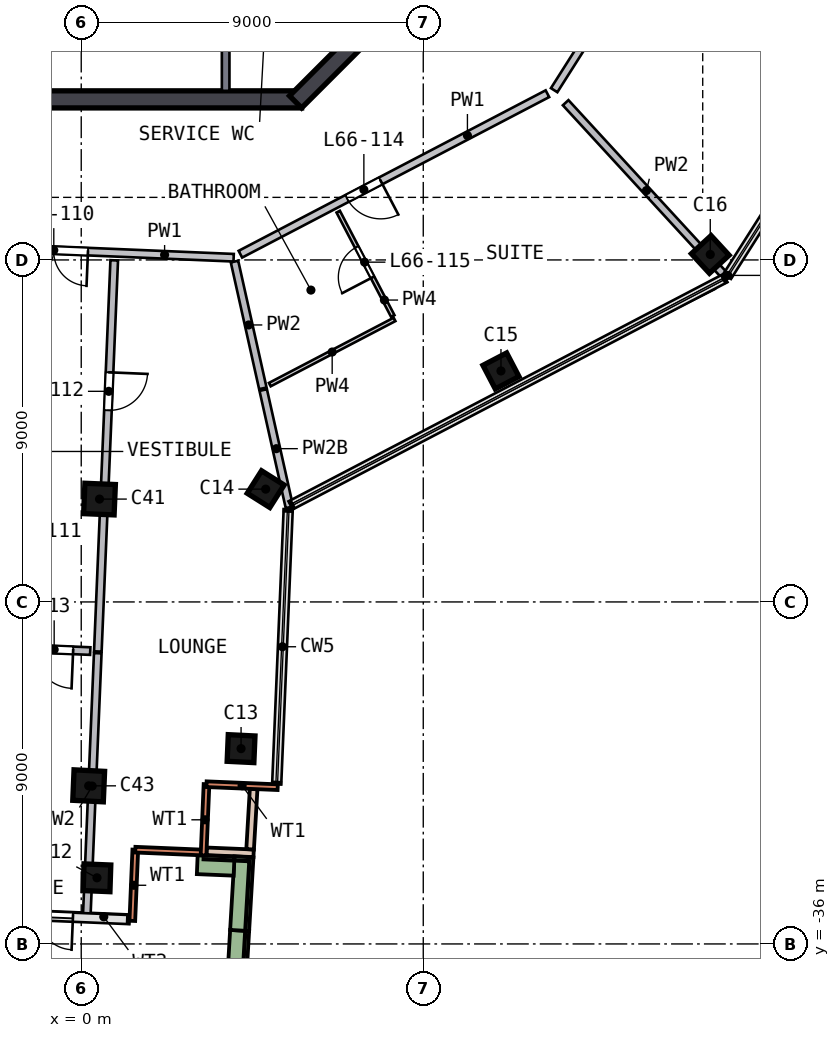
"""IFC4 building model, lengths in metres.
Left out: names, types, materials, properties, quantities, classifications, styles, units other than length and angle.
Written with IfcOpenShell. Run it as: python <this file> out.ifc"""

import sys

from ifc_helpers import new_model, si_unit, direction, frame, frame_2d, origin, origin_2d, place, context, subcontext, project, spatial, rectangle, extrude, element, fill, save


model = new_model("IFC4")
c1 = context("Model", 3, precision=1e-05, world=origin(), true_north=direction((0.0, 1.0)))
c2 = subcontext(c1, "Body", "Model", "MODEL_VIEW")
j1 = project(units=[si_unit("LENGTHUNIT", "METRE"), si_unit("PLANEANGLEUNIT", "RADIAN")], contexts=[c1])
p1 = place(None, origin())
s1 = spatial("IfcSite", under=j1, at=p1, CompositionType="ELEMENT")
p2 = place(p1, origin())
s2 = spatial("IfcBuilding", under=s1, at=p2, CompositionType="ELEMENT")
p3 = place(p2, frame((0.0, 0.0, 269.0)))
s3 = spatial("IfcBuildingStorey", under=s2, at=p3, CompositionType="ELEMENT", Elevation=269.0)
p4 = place(p3, frame((0.28, -34.157, 0.0), z_axis=(0.111186081, -0.084381834, 0.990210766), x_axis=(0.99292035, -0.032471752, -0.114257442)))
e1 = element("IfcColumn", 1, at=p4, inside=s3, PredefinedType="COLUMN", context=c2, shape_type="SweptSolid", body=[
    extrude(rectangle(XDim=0.7, YDim=0.7, at=origin_2d()), origin(), (0.0, 0.0, 1.0), 4.736),
])
p5 = place(p3, frame((4.085, -30.773, 0.0), z_axis=(0.100012936, -0.071961787, 0.992380428), x_axis=(0.048803713, 0.996535449, 0.067344607)))
e2 = element("IfcColumn", 2, at=p5, inside=s3, PredefinedType="COLUMN", context=c2, shape_type="SweptSolid", body=[
    extrude(rectangle(XDim=0.7, YDim=0.7, at=origin_2d()), origin(), (0.0, 0.0, 1.0), 4.726),
])
p6 = place(p3, frame((4.757, -24.052, 0.0), z_axis=(0.080208495, 0.016602017, 0.99663984), x_axis=(-0.53173331, -0.845000335, 0.056869329)))
e3 = element("IfcColumn", 3, at=p6, inside=s3, PredefinedType="COLUMN", context=c2, shape_type="SweptSolid", body=[
    extrude(rectangle(XDim=0.7, YDim=0.7, at=origin_2d()), origin(), (0.0, 0.0, 1.0), 4.706),
])
p7 = place(p3, frame((10.961, -20.966, 0.0), z_axis=(0.069744627, 0.037207513, 0.996870748), x_axis=(0.88346195, 0.461786436, -0.079046004)))
e4 = element("IfcColumn", 4, at=p7, inside=s3, PredefinedType="COLUMN", context=c2, shape_type="SweptSolid", body=[
    extrude(rectangle(XDim=0.7, YDim=0.7, at=origin_2d()), origin(), (0.0, 0.0, 1.0), 4.705),
])
p8 = place(p3, frame((16.481, -17.923, 0.0), z_axis=(0.059355146, 0.055567624, 0.996689122), x_axis=(-0.733316452, -0.675008632, 0.081303918)))
e5 = element("IfcColumn", 5, at=p8, inside=s3, PredefinedType="COLUMN", context=c2, shape_type="SweptSolid", body=[
    extrude(rectangle(XDim=0.7, YDim=0.7, at=origin_2d()), origin(), (0.0, 0.0, 1.0), 4.706),
])
p9 = place(p3, frame((0.383, -24.296, 0.0), z_axis=(0.081147279, 0.001919725, 0.996700273), x_axis=(-0.041927087, -0.999106414, 0.005337892)))
e6 = element("IfcColumn", 6, at=p9, inside=s3, PredefinedType="COLUMN", context=c2, shape_type="SweptSolid", body=[
    extrude(rectangle(XDim=0.8, YDim=0.8, at=origin_2d()), origin(), (0.0, 0.0, 1.0), 4.706),
])
p10 = place(p3, frame((0.071, -31.736, 0.0), z_axis=(0.10322703, -0.085222915, 0.991000119), x_axis=(-0.050566581, -0.995483953, -0.080341268)))
e7 = element("IfcColumn", 7, at=p10, inside=s3, PredefinedType="COLUMN", context=c2, shape_type="SweptSolid", body=[
    extrude(rectangle(XDim=0.8, YDim=0.8, at=origin_2d()), origin(), (0.0, 0.0, 1.0), 4.732),
])
p11 = place(p3, frame((-5.799, -13.775, 0.0), z_axis=(0.0, 0.0, 1.0), x_axis=(1.0, 0.0, 0.0)))
e8 = element("IfcWall", 8, at=p11, inside=s3, PredefinedType="SHEAR", context=c2, shape_type="SweptSolid", body=[
    extrude(rectangle(XDim=11.598, YDim=0.45, at=frame_2d((5.799, 0.0))), origin(), (0.0, 0.0, 1.0), 5.0),
])
p12 = place(p3, frame((5.64, -13.841, 0.0), z_axis=(0.0, 0.0, 1.0), x_axis=(0.707106781, 0.707106781, 0.0)))
e9 = element("IfcWall", 9, at=p12, inside=s3, PredefinedType="SHEAR", context=c2, shape_type="SweptSolid", body=[
    extrude(rectangle(XDim=11.598, YDim=0.45, at=frame_2d((5.799, 0.0))), origin(), (0.0, 0.0, 1.0), 5.0),
])
p13 = place(p12, frame((2.099, 0.0, 0.0)))
e10 = element("IfcOpeningElement", 10, at=p13, cuts=e9, PredefinedType="OPENING", context=c2, shape_type="SweptSolid", body=[
    extrude(rectangle(XDim=1.2, YDim=2.1, at=frame_2d((0.6, 1.05))), frame((0.0, 0.235, 0.0), z_axis=(0.0, -1.0, 0.0), x_axis=(1.0, 0.0, 0.0)), (0.0, 0.0, 1.0), 0.47),
])
p14 = place(p3, frame((1.344, -35.393, 0.0), z_axis=(0.0, 0.0, 1.0), x_axis=(0.041922975, 0.999120846, 0.0)))
e11 = element("IfcWall", 11, at=p14, inside=s3, PredefinedType="SOLIDWALL", context=c2, shape_type="SweptSolid", body=[
    extrude(rectangle(XDim=1.875, YDim=0.15, at=frame_2d((0.938, 0.0))), origin(), (0.0, 0.0, 1.0), 4.69),
])
p15 = place(p3, frame((1.423, -33.519, 0.0), z_axis=(0.0, 0.0, 1.0), x_axis=(0.999121279, -0.041912636, 0.0)))
e12 = element("IfcWall", 12, at=p15, inside=s3, PredefinedType="SOLIDWALL", context=c2, shape_type="SweptSolid", body=[
    extrude(rectangle(XDim=1.8, YDim=0.15, at=frame_2d((0.9, 0.0))), origin(), (0.0, 0.0, 1.0), 4.69),
])
for number, where, z_axis, x_axis in (
    (13, (3.218, -33.67, 0.0), (0.0, 0.0, 1.0), (0.042, 0.999, 0.0)),
    (14, (3.296, -31.796, 0.0), (0.0, 0.0, 1.0), (0.999, -0.042, 0.0)),
):
    element("IfcWall", number, at=place(p3, frame(where, z_axis=z_axis, x_axis=x_axis)), inside=s3, PredefinedType="SOLIDWALL", context=c2, shape_type="SweptSolid", body=[
        extrude(rectangle(XDim=1.875, YDim=0.15, at=frame_2d((0.938, 0.0))), origin(), (0.0, 0.0, 1.0), 4.69),
    ])
p16 = place(p3, frame((1.202, -35.312, 0.0), z_axis=(0.0, 0.0, 1.0), x_axis=(-0.99912264, 0.0418802, 0.0)))
e15 = element("IfcWall", 15, at=p16, inside=s3, PredefinedType="SOLIDWALL", context=c2, shape_type="SweptSolid", body=[
    extrude(rectangle(XDim=3.62, YDim=0.15, at=frame_2d((1.81, 0.0))), origin(), (0.0, 0.0, 1.0), 4.015),
])
p17 = place(p16, frame((1.42, 0.0, 0.0)))
e16 = element("IfcOpeningElement", 16, at=p17, cuts=e15, PredefinedType="OPENING", context=c2, shape_type="SweptSolid", body=[
    extrude(rectangle(XDim=1.8, YDim=2.4, at=frame_2d((0.9, 1.2))), frame((0.0, 0.085, 0.0), z_axis=(0.0, -1.0, 0.0), x_axis=(1.0, 0.0, 0.0)), (0.0, 0.0, 1.0), 0.17),
])
p18 = place(p3, frame((4.086, -37.046, 0.0), z_axis=(0.0, 0.0, 1.0), x_axis=(0.058640418, 0.99827917, 0.0)))
e17 = element("IfcWall", 17, at=p18, inside=s3, PredefinedType="SOLIDWALL", context=c2, shape_type="SweptSolid", body=[
    extrude(rectangle(XDim=1.403, YDim=0.5, at=frame_2d((0.702, 0.0))), origin(), (0.0, 0.0, 1.0), 0.7),
])
p19 = place(p3, frame((4.168, -35.646, 0.0), z_axis=(0.0, 0.0, 1.0), x_axis=(0.058670359, 0.998277411, 0.0)))
e18 = element("IfcWall", 18, at=p19, inside=s3, PredefinedType="SOLIDWALL", context=c2, shape_type="SweptSolid", body=[
    extrude(rectangle(XDim=1.939, YDim=0.5, at=frame_2d((0.97, 0.0))), origin(), (0.0, 0.0, 1.0), 0.7),
])
p20 = place(p3, frame((4.021, -33.954, 0.0), z_axis=(0.0, 0.0, 1.0), x_axis=(-0.999125196, 0.041819158, 0.0)))
e19 = element("IfcWall", 19, at=p20, inside=s3, PredefinedType="SOLIDWALL", context=c2, shape_type="SweptSolid", body=[
    extrude(rectangle(XDim=0.969, YDim=0.5, at=frame_2d((0.484, 0.0))), origin(), (0.0, 0.0, 1.0), 0.7),
])
p21 = place(p3, frame((3.298, -33.563, 0.0), z_axis=(0.0, 0.0, 1.0), x_axis=(0.99912657, -0.041786315, 0.0)))
e20 = element("IfcWall", 20, at=p21, inside=s3, PredefinedType="PARAPET", context=c2, shape_type="SweptSolid", body=[
    extrude(rectangle(XDim=1.239, YDim=0.2, at=frame_2d((0.619, 0.0))), origin(), (0.0, 0.0, 1.0), 1.1),
])
p22 = place(p3, frame((4.444, -33.509, 0.0), z_axis=(0.0, 0.0, 1.0), x_axis=(0.058586809, 0.998282318, 0.0)))
e21 = element("IfcWall", 21, at=p22, inside=s3, PredefinedType="PARAPET", context=c2, shape_type="SweptSolid", body=[
    extrude(rectangle(XDim=1.588, YDim=0.2, at=frame_2d((0.794, 0.0))), origin(), (0.0, 0.0, 1.0), 1.1),
])
p23 = place(p3, frame((3.8, -10.9, 0.0), z_axis=(0.0, 0.0, 1.0), x_axis=(0.0, -1.0, 0.0)))
e22 = element("IfcWall", 22, at=p23, inside=s3, PredefinedType="SOLIDWALL", context=c2, shape_type="SweptSolid", body=[
    extrude(rectangle(XDim=2.65, YDim=0.2, at=frame_2d((1.325, 0.0))), origin(), (0.0, 0.0, 1.0), 4.69),
])
p24 = place(p3, frame((4.01, -17.942, 0.0), z_axis=(0.0, 0.0, 1.0), x_axis=(-0.999123966, 0.041848536, 0.0)))
e23 = element("IfcWall", 23, at=p24, inside=s3, PredefinedType="SOLIDWALL", context=c2, shape_type="SweptSolid", body=[
    extrude(rectangle(XDim=9.317, YDim=0.2, at=frame_2d((4.658, 0.0))), origin(), (0.0, 0.0, 1.0), 4.69),
])
p25 = place(p24, frame((3.837, 0.0, 0.0)))
e24 = element("IfcOpeningElement", 24, at=p25, cuts=e23, PredefinedType="OPENING", context=c2, shape_type="SweptSolid", body=[
    extrude(rectangle(XDim=1.8, YDim=2.1, at=frame_2d((0.9, 1.05))), frame((0.0, 0.11, 0.0), z_axis=(0.0, -1.0, 0.0), x_axis=(1.0, 0.0, 0.0)), (0.0, 0.0, 1.0), 0.22),
])
p26 = place(p3, frame((12.267, -13.626, 0.0), z_axis=(0.0, 0.0, 1.0), x_axis=(-0.886204454, -0.463294363, 0.0)))
e25 = element("IfcWall", 25, at=p26, inside=s3, PredefinedType="SOLIDWALL", context=c2, shape_type="SweptSolid", body=[
    extrude(rectangle(XDim=9.116, YDim=0.2, at=frame_2d((4.558, 0.0))), origin(), (0.0, 0.0, 1.0), 4.69),
])
p27 = place(p26, frame((4.95, 0.0, 0.0)))
e26 = element("IfcOpeningElement", 26, at=p27, cuts=e25, PredefinedType="OPENING", context=c2, shape_type="SweptSolid", body=[
    extrude(rectangle(XDim=1.0, YDim=2.1, at=frame_2d((0.5, 1.05))), frame((0.0, 0.11, 0.0), z_axis=(0.0, -1.0, 0.0), x_axis=(1.0, 0.0, 0.0)), (0.0, 0.0, 1.0), 0.22),
])
p28 = place(p3, frame((12.444, -13.533, 0.0), z_axis=(0.0, 0.0, 1.0), x_axis=(0.535839212, 0.844320045, 0.0)))
e27 = element("IfcWall", 27, at=p28, inside=s3, PredefinedType="SOLIDWALL", context=c2, shape_type="SweptSolid", body=[
    extrude(rectangle(XDim=9.516, YDim=0.2, at=frame_2d((4.758, 0.0))), origin(), (0.0, 0.0, 1.0), 4.69),
])
p29 = place(p3, frame((0.237, -28.293, 0.0), z_axis=(0.0, 0.0, 1.0), x_axis=(-0.999120946, 0.041920578, 0.0)))
e28 = element("IfcWall", 28, at=p29, inside=s3, PredefinedType="SOLIDWALL", context=c2, shape_type="SweptSolid", body=[
    extrude(rectangle(XDim=2.941, YDim=0.2, at=frame_2d((1.471, 0.0))), origin(), (0.0, 0.0, 1.0), 4.69),
])
p30 = place(p29, frame((0.45, 0.0, 0.0)))
e29 = element("IfcOpeningElement", 29, at=p30, cuts=e28, PredefinedType="OPENING", context=c2, shape_type="SweptSolid", body=[
    extrude(rectangle(XDim=1.0, YDim=2.1, at=frame_2d((0.5, 1.05))), frame((0.0, 0.11, 0.0), z_axis=(0.0, -1.0, 0.0), x_axis=(1.0, 0.0, 0.0)), (0.0, 0.0, 1.0), 0.22),
])
p31 = place(p3, frame((0.142, -35.342, 0.0), z_axis=(0.0, 0.0, 1.0), x_axis=(0.041893155, 0.999122096, 0.0)))
e30 = element("IfcWall", 30, at=p31, inside=s3, PredefinedType="SOLIDWALL", context=c2, shape_type="SweptSolid", body=[
    extrude(rectangle(XDim=6.999, YDim=0.2, at=frame_2d((3.5, 0.0))), origin(), (0.0, 0.0, 1.0), 4.69),
])
p32 = place(p3, frame((0.868, -18.01, 0.0), z_axis=(0.0, 0.0, 1.0), x_axis=(-0.041875002, -0.999122857, 0.0)))
e31 = element("IfcWall", 31, at=p32, inside=s3, PredefinedType="SOLIDWALL", context=c2, shape_type="SweptSolid", body=[
    extrude(rectangle(XDim=10.302, YDim=0.2, at=frame_2d((5.151, 0.0))), origin(), (0.0, 0.0, 1.0), 4.69),
])
p33 = place(p32, frame((2.95, 0.0, 0.0)))
e32 = element("IfcOpeningElement", 32, at=p33, cuts=e31, PredefinedType="OPENING", context=c2, shape_type="SweptSolid", body=[
    extrude(rectangle(XDim=1.0, YDim=2.1, at=frame_2d((0.5, 1.05))), frame((0.0, 0.11, 0.0), z_axis=(0.0, -1.0, 0.0), x_axis=(1.0, 0.0, 0.0)), (0.0, 0.0, 1.0), 0.22),
])
p34 = place(p3, frame((4.033, -18.043, 0.0), z_axis=(0.0, 0.0, 1.0), x_axis=(0.218109953, -0.975924202, 0.0)))
e33 = element("IfcWall", 33, at=p34, inside=s3, PredefinedType="SOLIDWALL", context=c2, shape_type="SweptSolid", body=[
    extrude(rectangle(XDim=3.418, YDim=0.2, at=frame_2d((1.709, 0.0))), origin(), (0.0, 0.0, 1.0), 4.69),
])
p35 = place(p3, frame((4.789, -21.424, 0.0), z_axis=(0.0, 0.0, 1.0), x_axis=(0.218165001, -0.975911898, 0.0)))
e34 = element("IfcWall", 34, at=p35, inside=s3, PredefinedType="SOLIDWALL", context=c2, shape_type="SweptSolid", body=[
    extrude(rectangle(XDim=3.161, YDim=0.2, at=frame_2d((1.581, 0.0))), origin(), (0.0, 0.0, 1.0), 4.19),
])
p36 = place(p3, frame((16.999, -18.486, 0.0), z_axis=(0.0, 0.0, 1.0), x_axis=(-0.676871278, 0.736101401, 0.0)))
e35 = element("IfcWall", 35, at=p36, inside=s3, PredefinedType="SOLIDWALL", context=c2, shape_type="SweptSolid", body=[
    extrude(rectangle(XDim=6.282, YDim=0.2, at=frame_2d((3.141, 0.0))), origin(), (0.0, 0.0, 1.0), 4.69),
])
p37 = place(p3, frame((8.244, -19.565, 0.0), z_axis=(0.0, 0.0, 1.0), x_axis=(-0.886200227, -0.463302447, 0.0)))
e36 = element("IfcWall", 36, at=p37, inside=s3, PredefinedType="PARTITIONING", context=c2, shape_type="SweptSolid", body=[
    extrude(rectangle(XDim=3.704, YDim=0.1, at=frame_2d((1.852, 0.0))), origin(), (0.0, 0.0, 1.0), 4.69),
])
p38 = place(p3, frame((8.198, -19.477, 0.0), z_axis=(0.0, 0.0, 1.0), x_axis=(-0.463332934, 0.886184288, 0.0)))
e37 = element("IfcWall", 37, at=p38, inside=s3, PredefinedType="PARTITIONING", context=c2, shape_type="SweptSolid", body=[
    extrude(rectangle(XDim=3.1, YDim=0.1, at=frame_2d((1.55, 0.0))), origin(), (0.0, 0.0, 1.0), 4.69),
])
p39 = place(p38, frame((1.15, 0.0, 0.0)))
e38 = element("IfcOpeningElement", 38, at=p39, cuts=e37, PredefinedType="OPENING", context=c2, shape_type="SweptSolid", body=[
    extrude(rectangle(XDim=0.9, YDim=2.1, at=frame_2d((0.45, 1.05))), frame((0.0, 0.06, 0.0), z_axis=(0.0, -1.0, 0.0), x_axis=(1.0, 0.0, 0.0)), (0.0, 0.0, 1.0), 0.12),
])
p40 = place(p17, origin())
e39 = element("IfcDoor", 39, at=p40, inside=s3, OperationType="DOUBLE_DOOR_SINGLE_SWING", PredefinedType="DOOR", context=c2, shape_type="SweptSolid", body=[
    extrude(rectangle(XDim=1.8, YDim=2.4, at=frame_2d((0.9, 1.2))), frame((0.0, 0.025, 0.0), z_axis=(0.0, -1.0, 0.0), x_axis=(1.0, 0.0, 0.0)), (0.0, 0.0, 1.0), 0.05),
])
fill(e16, e39)
p41 = place(p25, origin())
e40 = element("IfcDoor", 40, at=p41, inside=s3, OperationType="DOUBLE_DOOR_SINGLE_SWING", PredefinedType="DOOR", context=c2, shape_type="SweptSolid", body=[
    extrude(rectangle(XDim=1.8, YDim=2.1, at=frame_2d((0.9, 1.05))), frame((0.0, 0.025, 0.0), z_axis=(0.0, -1.0, 0.0), x_axis=(1.0, 0.0, 0.0)), (0.0, 0.0, 1.0), 0.05),
])
fill(e24, e40)
p42 = place(p33, origin())
e41 = element("IfcDoor", 41, at=p42, inside=s3, OperationType="SINGLE_SWING_LEFT", PredefinedType="DOOR", context=c2, shape_type="SweptSolid", body=[
    extrude(rectangle(XDim=1.0, YDim=2.1, at=frame_2d((0.5, 1.05))), frame((0.0, 0.025, 0.0), z_axis=(0.0, -1.0, 0.0), x_axis=(1.0, 0.0, 0.0)), (0.0, 0.0, 1.0), 0.05),
])
fill(e32, e41)
p43 = place(p30, origin())
e42 = element("IfcDoor", 42, at=p43, inside=s3, OperationType="SINGLE_SWING_LEFT", PredefinedType="DOOR", context=c2, shape_type="SweptSolid", body=[
    extrude(rectangle(XDim=1.0, YDim=2.1, at=frame_2d((0.5, 1.05))), frame((0.0, 0.025, 0.0), z_axis=(0.0, -1.0, 0.0), x_axis=(1.0, 0.0, 0.0)), (0.0, 0.0, 1.0), 0.05),
])
fill(e29, e42)
p44 = place(p27, origin())
e43 = element("IfcDoor", 43, at=p44, inside=s3, OperationType="SINGLE_SWING_LEFT", PredefinedType="DOOR", context=c2, shape_type="SweptSolid", body=[
    extrude(rectangle(XDim=1.0, YDim=2.1, at=frame_2d((0.5, 1.05))), frame((0.0, 0.025, 0.0), z_axis=(0.0, -1.0, 0.0), x_axis=(1.0, 0.0, 0.0)), (0.0, 0.0, 1.0), 0.05),
])
fill(e26, e43)
p45 = place(p39, origin())
e44 = element("IfcDoor", 44, at=p45, inside=s3, OperationType="SINGLE_SWING_LEFT", PredefinedType="DOOR", context=c2, shape_type="SweptSolid", body=[
    extrude(rectangle(XDim=0.9, YDim=2.1, at=frame_2d((0.45, 1.05))), frame((0.0, 0.025, 0.0), z_axis=(0.0, -1.0, 0.0), x_axis=(1.0, 0.0, 0.0)), (0.0, 0.0, 1.0), 0.05),
])
fill(e38, e44)
save(model, sys.argv[1])
